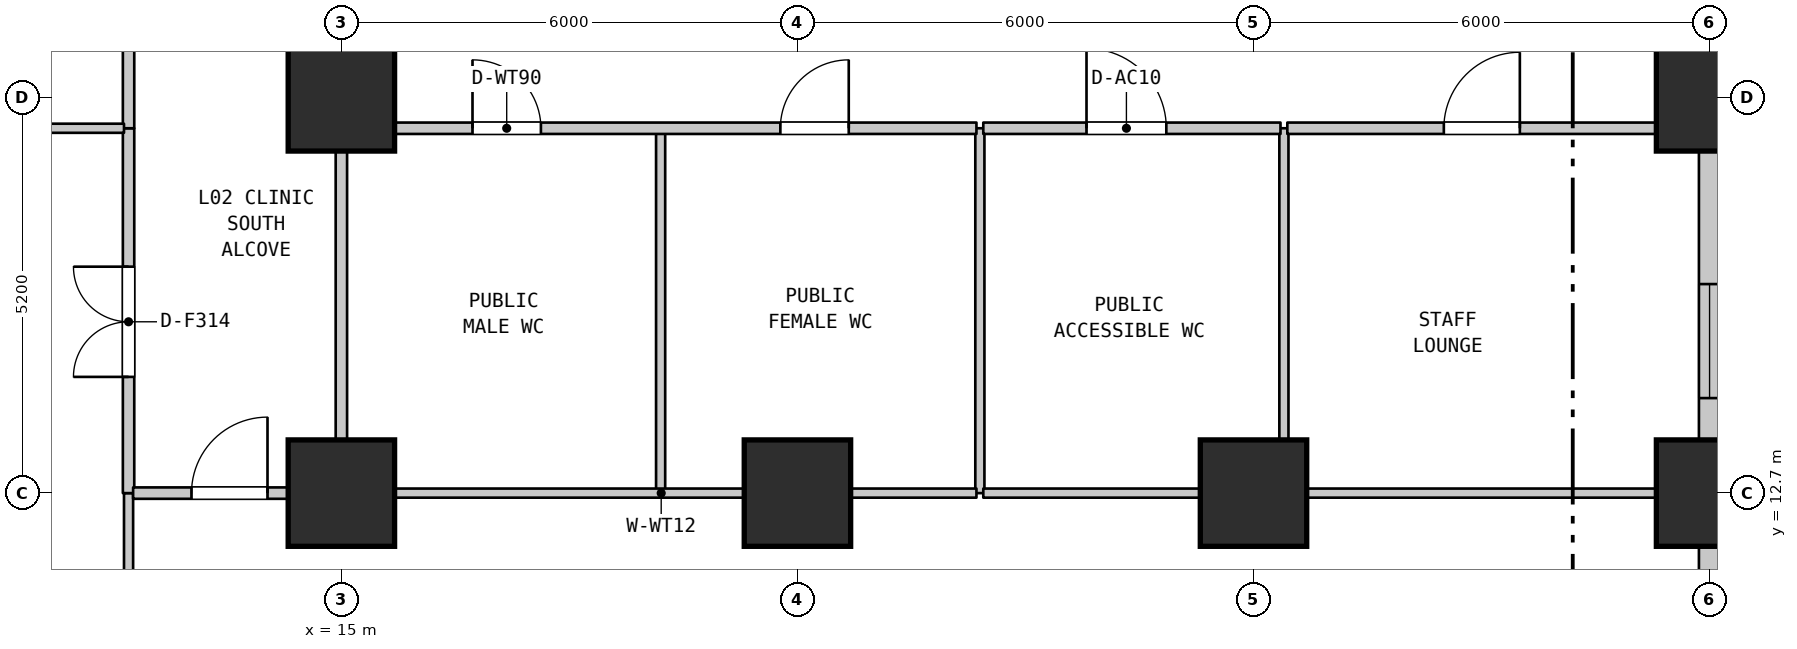
"""IFC4 building model, lengths in metres.
Left out: names, types, materials, properties, quantities, classifications, styles, units other than length and angle.
Written with IfcOpenShell. Run it as: python <this file> out.ifc"""

import sys

from ifc_helpers import new_model, si_unit, direction, frame, frame_2d, origin, origin_2d, place, context, subcontext, project, spatial, rectangle, extrude, element, fill, save


model = new_model("IFC4")
c1 = context("Model", 3, precision=1e-05, world=origin(), true_north=direction((0.0, 1.0)))
c2 = subcontext(c1, "Body", "Model", "MODEL_VIEW")
j1 = project(units=[si_unit("LENGTHUNIT", "METRE"), si_unit("PLANEANGLEUNIT", "RADIAN")], contexts=[c1])
p1 = place(None, origin())
s1 = spatial("IfcSite", under=j1, at=p1, CompositionType="ELEMENT")
p2 = place(p1, origin())
s2 = spatial("IfcBuilding", under=s1, at=p2, CompositionType="ELEMENT")
p3 = place(p2, frame((0.0, 0.0, 13.0)))
s3 = spatial("IfcBuildingStorey", under=s2, at=p3, CompositionType="ELEMENT", Elevation=13.0)
for number, where, z_axis, x_axis in (
    (1, (15.0, 12.7, 0.0), (0.0, 0.0, 1.0), (1.0, 0.0, 0.0)),
    (2, (15.0, 17.9, 0.0), (0.0, 0.0, 1.0), (1.0, 0.0, 0.0)),
    (3, (21.0, 12.7, 0.0), (0.0, 0.0, 1.0), (1.0, 0.0, 0.0)),
    (4, (27.0, 12.7, 0.0), (0.0, 0.0, 1.0), (1.0, 0.0, 0.0)),
):
    element("IfcColumn", number, at=place(p3, frame(where, z_axis=z_axis, x_axis=x_axis)), inside=s3, PredefinedType="COLUMN", context=c2, shape_type="SweptSolid", body=[
        extrude(rectangle(XDim=1.4, YDim=1.4, at=origin_2d()), origin(), (0.0, 0.0, 1.0), 6.0),
    ])
for number, where, z_axis, x_axis in (
    (5, (33.0, 12.7, 0.0), (0.0, 0.0, 1.0), (1.0, 0.0, 0.0)),
    (6, (33.0, 17.9, 0.0), (0.0, 0.0, 1.0), (1.0, 0.0, 0.0)),
):
    element("IfcColumn", number, at=place(p3, frame(where, z_axis=z_axis, x_axis=x_axis)), inside=s3, PredefinedType="PILASTER", context=c2, shape_type="SweptSolid", body=[
        extrude(rectangle(XDim=1.4, YDim=1.4, at=origin_2d()), origin(), (0.0, 0.0, 1.0), 6.0),
    ])
p4 = place(p3, frame((12.2, 0.71, 0.0), z_axis=(0.0, 0.0, 1.0), x_axis=(0.0, 1.0, 0.0)))
e7 = element("IfcWall", 7, at=p4, inside=s3, PredefinedType="PARTITIONING", context=c2, shape_type="SweptSolid", body=[
    extrude(rectangle(XDim=11.99, YDim=0.12, at=frame_2d((5.995, 0.0))), origin(), (0.0, 0.0, 1.0), 5.58),
])
p5 = place(p3, frame((12.2, 12.7, 0.0), z_axis=(0.0, 0.0, 1.0), x_axis=(0.0, 1.0, 0.0)))
e8 = element("IfcWall", 8, at=p5, inside=s3, PredefinedType="STANDARD", context=c2, shape_type="SweptSolid", body=[
    extrude(rectangle(XDim=4.8, YDim=0.15, at=frame_2d((2.4, 0.0))), origin(), (0.0, 0.0, 1.0), 5.58),
])
p6 = place(p5, frame((1.529, 0.0, 0.0)))
e9 = element("IfcOpeningElement", 9, at=p6, cuts=e8, PredefinedType="OPENING", context=c2, shape_type="SweptSolid", body=[
    extrude(rectangle(XDim=1.45, YDim=2.2, at=frame_2d((0.725, 1.1))), frame((0.0, 0.085, 0.0), z_axis=(0.0, -1.0, 0.0), x_axis=(1.0, 0.0, 0.0)), (0.0, 0.0, 1.0), 0.17),
])
p7 = place(p3, frame((12.2, 17.5, 0.0), z_axis=(0.0, 0.0, 1.0), x_axis=(0.0, 1.0, 0.0)))
e10 = element("IfcWall", 10, at=p7, inside=s3, PredefinedType="STANDARD", context=c2, shape_type="SweptSolid", body=[
    extrude(rectangle(XDim=8.5, YDim=0.15, at=frame_2d((4.25, 0.0))), origin(), (0.0, 0.0, 1.0), 5.58),
])
p8 = place(p7, frame((3.8, 0.0, 0.0)))
e11 = element("IfcOpeningElement", 11, at=p8, cuts=e10, PredefinedType="OPENING", context=c2, shape_type="SweptSolid", body=[
    extrude(rectangle(XDim=1.0, YDim=2.15, at=frame_2d((0.5, 1.075))), frame((0.0, 0.085, 0.0), z_axis=(0.0, -1.0, 0.0), x_axis=(1.0, 0.0, 0.0)), (0.0, 0.0, 1.0), 0.17),
])
p9 = place(p3, frame((15.0, 12.7, 0.0), z_axis=(0.0, 0.0, 1.0), x_axis=(0.0, 1.0, 0.0)))
e12 = element("IfcWall", 12, at=p9, inside=s3, PredefinedType="STANDARD", context=c2, shape_type="SweptSolid", body=[
    extrude(rectangle(XDim=4.8, YDim=0.15, at=frame_2d((2.4, 0.0))), origin(), (0.0, 0.0, 1.0), 5.08),
])
for number, where, z_axis, x_axis in (
    (13, (19.2, 12.7, 0.0), (0.0, 0.0, 1.0), (0.0, 1.0, 0.0)),
    (14, (23.4, 12.7, 0.0), (0.0, 0.0, 1.0), (0.0, 1.0, 0.0)),
    (15, (27.4, 12.7, 0.0), (0.0, 0.0, 1.0), (0.0, 1.0, 0.0)),
):
    element("IfcWall", number, at=place(p3, frame(where, z_axis=z_axis, x_axis=x_axis)), inside=s3, PredefinedType="PARTITIONING", context=c2, shape_type="SweptSolid", body=[
        extrude(rectangle(XDim=4.8, YDim=0.12, at=frame_2d((2.4, 0.0))), origin(), (0.0, 0.0, 1.0), 5.58),
    ])
p10 = place(p3, frame((12.26, 12.7, 0.0), z_axis=(0.0, 0.0, 1.0), x_axis=(1.0, 0.0, 0.0)))
e16 = element("IfcWall", 16, at=p10, inside=s3, PredefinedType="STANDARD", context=c2, shape_type="SweptSolid", body=[
    extrude(rectangle(XDim=2.68, YDim=0.15, at=frame_2d((1.34, 0.0))), origin(), (0.0, 0.0, 1.0), 5.58),
])
p11 = place(p10, frame((0.768, 0.0, 0.0)))
e17 = element("IfcOpeningElement", 17, at=p11, cuts=e16, PredefinedType="OPENING", context=c2, shape_type="SweptSolid", body=[
    extrude(rectangle(XDim=1.0, YDim=2.15, at=frame_2d((0.5, 1.075))), frame((0.0, 0.085, 0.0), z_axis=(0.0, -1.0, 0.0), x_axis=(1.0, 0.0, 0.0)), (0.0, 0.0, 1.0), 0.17),
])
p12 = place(p3, frame((15.06, 12.7, 0.0), z_axis=(0.0, 0.0, 1.0), x_axis=(1.0, 0.0, 0.0)))
e18 = element("IfcWall", 18, at=p12, inside=s3, PredefinedType="PARTITIONING", context=c2, shape_type="SweptSolid", body=[
    extrude(rectangle(XDim=8.295, YDim=0.12, at=frame_2d((4.147, 0.0))), origin(), (0.0, 0.0, 1.0), 4.98),
])
p13 = place(p3, frame((23.445, 12.7, 0.0), z_axis=(0.0, 0.0, 1.0), x_axis=(1.0, 0.0, 0.0)))
e19 = element("IfcWall", 19, at=p13, inside=s3, PredefinedType="PARTITIONING", context=c2, shape_type="SweptSolid", body=[
    extrude(rectangle(XDim=3.91, YDim=0.12, at=frame_2d((1.955, 0.0))), origin(), (0.0, 0.0, 1.0), 4.98),
])
p14 = place(p3, frame((27.445, 12.7, 0.0), z_axis=(0.0, 0.0, 1.0), x_axis=(1.0, 0.0, 0.0)))
e20 = element("IfcWall", 20, at=p14, inside=s3, PredefinedType="PARTITIONING", context=c2, shape_type="SweptSolid", body=[
    extrude(rectangle(XDim=5.545, YDim=0.12, at=frame_2d((2.772, 0.0))), origin(), (0.0, 0.0, 1.0), 4.98),
])
p15 = place(p3, frame((3.69, 17.5, 0.0), z_axis=(0.0, 0.0, 1.0), x_axis=(1.0, 0.0, 0.0)))
e21 = element("IfcWall", 21, at=p15, inside=s3, PredefinedType="PARTITIONING", context=c2, shape_type="SweptSolid", body=[
    extrude(rectangle(XDim=8.45, YDim=0.12, at=frame_2d((4.225, 0.0))), origin(), (0.0, 0.0, 1.0), 4.38),
])
p16 = place(p3, frame((15.06, 17.5, 0.0), z_axis=(0.0, 0.0, 1.0), x_axis=(1.0, 0.0, 0.0)))
e22 = element("IfcWall", 22, at=p16, inside=s3, PredefinedType="STANDARD", context=c2, shape_type="SweptSolid", body=[
    extrude(rectangle(XDim=8.295, YDim=0.15, at=frame_2d((4.147, 0.0))), origin(), (0.0, 0.0, 1.0), 5.58),
])
p17 = place(p16, frame((1.665, 0.0, 0.0)))
e23 = element("IfcOpeningElement", 23, at=p17, cuts=e22, PredefinedType="OPENING", context=c2, shape_type="SweptSolid", body=[
    extrude(rectangle(XDim=0.9, YDim=2.1, at=frame_2d((0.45, 1.05))), frame((0.0, 0.085, 0.0), z_axis=(0.0, -1.0, 0.0), x_axis=(1.0, 0.0, 0.0)), (0.0, 0.0, 1.0), 0.17),
])
p18 = place(p16, frame((5.715, 0.0, 0.0)))
e24 = element("IfcOpeningElement", 24, at=p18, cuts=e22, PredefinedType="OPENING", context=c2, shape_type="SweptSolid", body=[
    extrude(rectangle(XDim=0.9, YDim=2.1, at=frame_2d((0.45, 1.05))), frame((0.0, 0.085, 0.0), z_axis=(0.0, -1.0, 0.0), x_axis=(1.0, 0.0, 0.0)), (0.0, 0.0, 1.0), 0.17),
])
p19 = place(p3, frame((23.445, 17.5, 0.0), z_axis=(0.0, 0.0, 1.0), x_axis=(1.0, 0.0, 0.0)))
e25 = element("IfcWall", 25, at=p19, inside=s3, PredefinedType="STANDARD", context=c2, shape_type="SweptSolid", body=[
    extrude(rectangle(XDim=3.91, YDim=0.15, at=frame_2d((1.955, 0.0))), origin(), (0.0, 0.0, 1.0), 5.58),
])
p20 = place(p19, frame((1.358, 0.0, 0.0)))
e26 = element("IfcOpeningElement", 26, at=p20, cuts=e25, PredefinedType="OPENING", context=c2, shape_type="SweptSolid", body=[
    extrude(rectangle(XDim=1.05, YDim=2.15, at=frame_2d((0.525, 1.075))), frame((0.0, 0.085, 0.0), z_axis=(0.0, -1.0, 0.0), x_axis=(1.0, 0.0, 0.0)), (0.0, 0.0, 1.0), 0.17),
])
p21 = place(p3, frame((27.445, 17.5, 0.0), z_axis=(0.0, 0.0, 1.0), x_axis=(1.0, 0.0, 0.0)))
e27 = element("IfcWall", 27, at=p21, inside=s3, PredefinedType="STANDARD", context=c2, shape_type="SweptSolid", body=[
    extrude(rectangle(XDim=5.545, YDim=0.15, at=frame_2d((2.772, 0.0))), origin(), (0.0, 0.0, 1.0), 5.58),
])
p22 = place(p21, frame((2.059, 0.0, 0.0)))
e28 = element("IfcOpeningElement", 28, at=p22, cuts=e27, PredefinedType="OPENING", context=c2, shape_type="SweptSolid", body=[
    extrude(rectangle(XDim=1.0, YDim=2.15, at=frame_2d((0.5, 1.075))), frame((0.0, 0.085, 0.0), z_axis=(0.0, -1.0, 0.0), x_axis=(1.0, 0.0, 0.0)), (0.0, 0.0, 1.0), 0.17),
])
p23 = place(p3, frame((33.0, 37.9, 0.0), z_axis=(0.0, 0.0, 1.0), x_axis=(0.0, -1.0, 0.0)))
e29 = element("IfcWall", 29, at=p23, inside=s3, PredefinedType="STANDARD", context=c2, shape_type="SweptSolid", body=[
    extrude(rectangle(XDim=37.2, YDim=0.28, at=frame_2d((18.6, 0.0))), origin(), (0.0, 0.0, 1.0), 5.08),
])
p24 = place(p23, frame((1.86, 0.0, 0.95)))
e30 = element("IfcOpeningElement", 30, at=p24, cuts=e29, PredefinedType="OPENING", context=c2, shape_type="SweptSolid", body=[
    extrude(rectangle(XDim=1.5, YDim=1.8, at=frame_2d((0.75, 0.9))), frame((0.0, 0.15, 0.0), z_axis=(0.0, -1.0, 0.0), x_axis=(1.0, 0.0, 0.0)), (0.0, 0.0, 1.0), 0.3),
])
p25 = place(p23, frame((7.12, 0.0, 0.95)))
e31 = element("IfcOpeningElement", 31, at=p25, cuts=e29, PredefinedType="OPENING", context=c2, shape_type="SweptSolid", body=[
    extrude(rectangle(XDim=1.5, YDim=1.8, at=frame_2d((0.75, 0.9))), frame((0.0, 0.15, 0.0), z_axis=(0.0, -1.0, 0.0), x_axis=(1.0, 0.0, 0.0)), (0.0, 0.0, 1.0), 0.3),
])
p26 = place(p23, frame((12.38, 0.0, 0.95)))
e32 = element("IfcOpeningElement", 32, at=p26, cuts=e29, PredefinedType="OPENING", context=c2, shape_type="SweptSolid", body=[
    extrude(rectangle(XDim=1.5, YDim=1.8, at=frame_2d((0.75, 0.9))), frame((0.0, 0.15, 0.0), z_axis=(0.0, -1.0, 0.0), x_axis=(1.0, 0.0, 0.0)), (0.0, 0.0, 1.0), 0.3),
])
p27 = place(p23, frame((17.19, 0.0, 0.95)))
e33 = element("IfcOpeningElement", 33, at=p27, cuts=e29, PredefinedType="OPENING", context=c2, shape_type="SweptSolid", body=[
    extrude(rectangle(XDim=1.5, YDim=1.8, at=frame_2d((0.75, 0.9))), frame((0.0, 0.15, 0.0), z_axis=(0.0, -1.0, 0.0), x_axis=(1.0, 0.0, 0.0)), (0.0, 0.0, 1.0), 0.3),
])
p28 = place(p23, frame((22.45, 0.0, 0.95)))
e34 = element("IfcOpeningElement", 34, at=p28, cuts=e29, PredefinedType="OPENING", context=c2, shape_type="SweptSolid", body=[
    extrude(rectangle(XDim=1.5, YDim=1.8, at=frame_2d((0.75, 0.9))), frame((0.0, 0.15, 0.0), z_axis=(0.0, -1.0, 0.0), x_axis=(1.0, 0.0, 0.0)), (0.0, 0.0, 1.0), 0.3),
])
p29 = place(p23, frame((28.16, 0.0, 0.95)))
e35 = element("IfcOpeningElement", 35, at=p29, cuts=e29, PredefinedType="OPENING", context=c2, shape_type="SweptSolid", body=[
    extrude(rectangle(XDim=1.5, YDim=1.8, at=frame_2d((0.75, 0.9))), frame((0.0, 0.15, 0.0), z_axis=(0.0, -1.0, 0.0), x_axis=(1.0, 0.0, 0.0)), (0.0, 0.0, 1.0), 0.3),
])
p30 = place(p23, frame((33.42, 0.0, 0.95)))
e36 = element("IfcOpeningElement", 36, at=p30, cuts=e29, PredefinedType="OPENING", context=c2, shape_type="SweptSolid", body=[
    extrude(rectangle(XDim=1.5, YDim=1.8, at=frame_2d((0.75, 0.9))), frame((0.0, 0.15, 0.0), z_axis=(0.0, -1.0, 0.0), x_axis=(1.0, 0.0, 0.0)), (0.0, 0.0, 1.0), 0.3),
])
p31 = place(p28, origin())
e37 = element("IfcWindow", 37, at=p31, inside=s3, PartitioningType="SINGLE_PANEL", PredefinedType="WINDOW", context=c2, shape_type="SweptSolid", body=[
    extrude(rectangle(XDim=1.5, YDim=1.8, at=frame_2d((0.75, 0.9))), frame((0.0, 0.03, 0.0), z_axis=(0.0, -1.0, 0.0), x_axis=(1.0, 0.0, 0.0)), (0.0, 0.0, 1.0), 0.06),
])
fill(e34, e37)
p32 = place(p6, origin())
e38 = element("IfcDoor", 38, at=p32, inside=s3, OperationType="DOUBLE_DOOR_SINGLE_SWING", PredefinedType="DOOR", context=c2, shape_type="SweptSolid", body=[
    extrude(rectangle(XDim=1.45, YDim=2.2, at=frame_2d((0.725, 1.1))), frame((0.0, 0.025, 0.0), z_axis=(0.0, -1.0, 0.0), x_axis=(1.0, 0.0, 0.0)), (0.0, 0.0, 1.0), 0.05),
])
fill(e9, e38)
p33 = place(p11, origin())
e39 = element("IfcDoor", 39, at=p33, inside=s3, OperationType="SINGLE_SWING_RIGHT", PredefinedType="DOOR", context=c2, shape_type="SweptSolid", body=[
    extrude(rectangle(XDim=1.0, YDim=2.15, at=frame_2d((0.5, 1.075))), frame((0.0, 0.025, 0.0), z_axis=(0.0, -1.0, 0.0), x_axis=(1.0, 0.0, 0.0)), (0.0, 0.0, 1.0), 0.05),
])
fill(e17, e39)
p34 = place(p17, origin())
e40 = element("IfcDoor", 40, at=p34, inside=s3, OperationType="SINGLE_SWING_LEFT", PredefinedType="DOOR", context=c2, shape_type="SweptSolid", body=[
    extrude(rectangle(XDim=0.9, YDim=2.1, at=frame_2d((0.45, 1.05))), frame((0.0, 0.025, 0.0), z_axis=(0.0, -1.0, 0.0), x_axis=(1.0, 0.0, 0.0)), (0.0, 0.0, 1.0), 0.05),
])
fill(e23, e40)
p35 = place(p18, origin())
e41 = element("IfcDoor", 41, at=p35, inside=s3, OperationType="SINGLE_SWING_RIGHT", PredefinedType="DOOR", context=c2, shape_type="SweptSolid", body=[
    extrude(rectangle(XDim=0.9, YDim=2.1, at=frame_2d((0.45, 1.05))), frame((0.0, 0.025, 0.0), z_axis=(0.0, -1.0, 0.0), x_axis=(1.0, 0.0, 0.0)), (0.0, 0.0, 1.0), 0.05),
])
fill(e24, e41)
p36 = place(p20, origin())
e42 = element("IfcDoor", 42, at=p36, inside=s3, OperationType="SINGLE_SWING_LEFT", PredefinedType="DOOR", context=c2, shape_type="SweptSolid", body=[
    extrude(rectangle(XDim=1.05, YDim=2.15, at=frame_2d((0.525, 1.075))), frame((0.0, 0.025, 0.0), z_axis=(0.0, -1.0, 0.0), x_axis=(1.0, 0.0, 0.0)), (0.0, 0.0, 1.0), 0.05),
])
fill(e26, e42)
p37 = place(p22, origin())
e43 = element("IfcDoor", 43, at=p37, inside=s3, OperationType="SINGLE_SWING_RIGHT", PredefinedType="DOOR", context=c2, shape_type="SweptSolid", body=[
    extrude(rectangle(XDim=1.0, YDim=2.15, at=frame_2d((0.5, 1.075))), frame((0.0, 0.025, 0.0), z_axis=(0.0, -1.0, 0.0), x_axis=(1.0, 0.0, 0.0)), (0.0, 0.0, 1.0), 0.05),
])
fill(e28, e43)
save(model, sys.argv[1])
